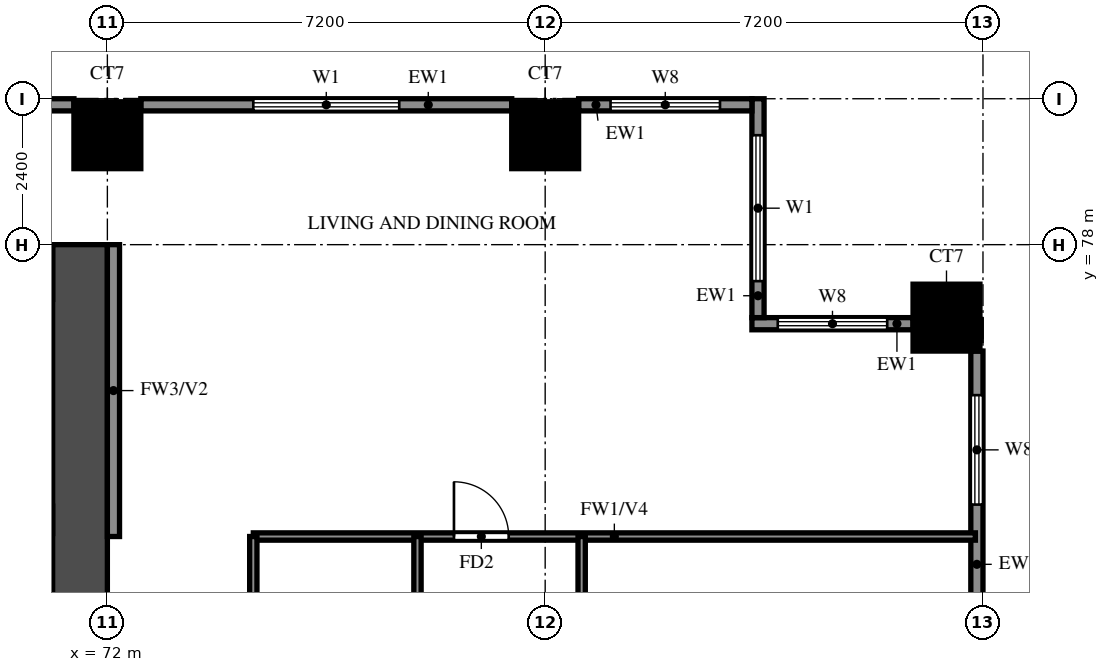
"""IFC4 building model, lengths in metres.
Left out: names, types, materials, properties, quantities, classifications, styles, units other than length and angle.
Written with IfcOpenShell. Run it as: python <this file> out.ifc"""

import sys

from ifc_helpers import new_model, si_unit, direction, frame, frame_2d, origin, origin_2d, place, context, subcontext, project, spatial, rectangle, extrude, source, transform, mapped, element, fill, save


model = new_model("IFC4")
c1 = context("Model", 3, precision=1e-05, world=origin(), true_north=direction((0.0, 1.0)))
c2 = subcontext(c1, "Body", "Model", "MODEL_VIEW")
j1 = project(units=[si_unit("LENGTHUNIT", "METRE"), si_unit("PLANEANGLEUNIT", "RADIAN")], contexts=[c1])
p1 = place(None, origin())
s1 = spatial("IfcSite", under=j1, at=p1, CompositionType="ELEMENT")
p2 = place(p1, origin())
s2 = spatial("IfcBuilding", under=s1, at=p2, CompositionType="ELEMENT")
p3 = place(p2, frame((0.0, 0.0, 55.0)))
s3 = spatial("IfcBuildingStorey", under=s2, at=p3, CompositionType="ELEMENT", Elevation=55.0)
m1 = source(origin(), c2, "Body", "SweptSolid", [
    extrude(rectangle(XDim=1.1, YDim=1.1, at=origin_2d()), origin(), (0.0, 0.0, 1.0), 3.18),
])
for number, where, z_axis, x_axis in (
    (1, (85.8, 76.8, 0.0), (0.0, 0.0, 1.0), (1.0, 0.0, 0.0)),
    (2, (72.0, 79.8, 0.0), (0.0, 0.0, 1.0), (1.0, 0.0, 0.0)),
    (3, (79.2, 79.8, 0.0), (0.0, 0.0, 1.0), (1.0, 0.0, 0.0)),
):
    element("IfcColumn", number, at=place(p3, frame(where, z_axis=z_axis, x_axis=x_axis)), inside=s3, PredefinedType="COLUMN", context=c2, shape_type="MappedRepresentation", body=[
        mapped(m1, transform((0.0, 0.0, 0.0))),
    ])
p4 = place(p3, frame((71.55, 66.0, 0.0), z_axis=(0.0, 0.0, 1.0), x_axis=(0.0, 1.0, 0.0)))
e4 = element("IfcWall", 4, at=p4, inside=s3, PredefinedType="SHEAR", context=c2, shape_type="SweptSolid", body=[
    extrude(rectangle(XDim=12.0, YDim=0.9, at=frame_2d((6.0, 0.0))), origin(), (0.0, 0.0, 1.0), 3.18),
])
p5 = place(p3, frame((29.7, 77.55, 0.0), z_axis=(0.0, 0.0, 1.0), x_axis=(1.0, 0.0, 0.0)))
e5 = element("IfcWall", 5, at=p5, inside=s3, PredefinedType="SHEAR", context=c2, shape_type="SweptSolid", body=[
    extrude(rectangle(XDim=41.4, YDim=0.9, at=frame_2d((20.7, 0.0))), origin(), (0.0, 0.0, 1.0), 3.18),
])
p6 = place(p3, frame((86.3, 70.15, 0.0), z_axis=(0.0, 0.0, 1.0), x_axis=(0.0, 1.0, 0.0)))
e6 = element("IfcWall", 6, at=p6, inside=s3, PredefinedType="SOLIDWALL", context=c2, shape_type="SweptSolid", body=[
    extrude(rectangle(XDim=6.1, YDim=0.2, at=frame_2d((3.05, 0.0))), origin(), (0.0, 0.0, 1.0), 3.18),
])
p7 = place(p6, frame((1.175, 0.0, 1.5)))
e7 = element("IfcOpeningElement", 7, at=p7, cuts=e6, PredefinedType="OPENING", context=c2, shape_type="SweptSolid", body=[
    extrude(rectangle(XDim=0.9, YDim=0.9, at=frame_2d((0.45, 0.45))), frame((0.0, 0.11, 0.0), z_axis=(0.0, -1.0, 0.0), x_axis=(1.0, 0.0, 0.0)), (0.0, 0.0, 1.0), 0.22),
])
p8 = place(p6, frame((3.575, 0.0, 0.6)))
e8 = element("IfcOpeningElement", 8, at=p8, cuts=e6, PredefinedType="OPENING", context=c2, shape_type="SweptSolid", body=[
    extrude(rectangle(XDim=1.8, YDim=2.4, at=frame_2d((0.9, 1.2))), frame((0.0, 0.11, 0.0), z_axis=(0.0, -1.0, 0.0), x_axis=(1.0, 0.0, 0.0)), (0.0, 0.0, 1.0), 0.22),
])
p9 = place(p3, frame((85.25, 76.7, 0.0), z_axis=(0.0, 0.0, 1.0), x_axis=(-1.0, 0.0, 0.0)))
e9 = element("IfcWall", 9, at=p9, inside=s3, PredefinedType="SOLIDWALL", context=c2, shape_type="SweptSolid", body=[
    extrude(rectangle(XDim=2.65, YDim=0.2, at=frame_2d((1.325, 0.0))), origin(), (0.0, 0.0, 1.0), 3.18),
])
p10 = place(p9, frame((0.425, 0.0, 0.6)))
e10 = element("IfcOpeningElement", 10, at=p10, cuts=e9, PredefinedType="OPENING", context=c2, shape_type="SweptSolid", body=[
    extrude(rectangle(XDim=1.8, YDim=2.4, at=frame_2d((0.9, 1.2))), frame((0.0, 0.11, 0.0), z_axis=(0.0, -1.0, 0.0), x_axis=(1.0, 0.0, 0.0)), (0.0, 0.0, 1.0), 0.22),
])
p11 = place(p3, frame((82.7, 76.8, 0.0), z_axis=(0.0, 0.0, 1.0), x_axis=(0.0, 1.0, 0.0)))
e11 = element("IfcWall", 11, at=p11, inside=s3, PredefinedType="SOLIDWALL", context=c2, shape_type="SweptSolid", body=[
    extrude(rectangle(XDim=3.6, YDim=0.2, at=frame_2d((1.8, 0.0))), origin(), (0.0, 0.0, 1.0), 3.18),
])
p12 = place(p11, frame((0.6, 0.0, 0.6)))
e12 = element("IfcOpeningElement", 12, at=p12, cuts=e11, PredefinedType="OPENING", context=c2, shape_type="SweptSolid", body=[
    extrude(rectangle(XDim=2.4, YDim=2.4, at=frame_2d((1.2, 1.2))), frame((0.0, 0.11, 0.0), z_axis=(0.0, -1.0, 0.0), x_axis=(1.0, 0.0, 0.0)), (0.0, 0.0, 1.0), 0.22),
])
p13 = place(p3, frame((82.6, 80.3, 0.0), z_axis=(0.0, 0.0, 1.0), x_axis=(-1.0, 0.0, 0.0)))
e13 = element("IfcWall", 13, at=p13, inside=s3, PredefinedType="SOLIDWALL", context=c2, shape_type="SweptSolid", body=[
    extrude(rectangle(XDim=2.85, YDim=0.2, at=frame_2d((1.425, 0.0))), origin(), (0.0, 0.0, 1.0), 3.18),
])
p14 = place(p13, frame((0.525, 0.0, 0.6)))
e14 = element("IfcOpeningElement", 14, at=p14, cuts=e13, PredefinedType="OPENING", context=c2, shape_type="SweptSolid", body=[
    extrude(rectangle(XDim=1.8, YDim=2.4, at=frame_2d((0.9, 1.2))), frame((0.0, 0.11, 0.0), z_axis=(0.0, -1.0, 0.0), x_axis=(1.0, 0.0, 0.0)), (0.0, 0.0, 1.0), 0.22),
])
p15 = place(p3, frame((78.65, 80.3, 0.0), z_axis=(0.0, 0.0, 1.0), x_axis=(-1.0, 0.0, 0.0)))
e15 = element("IfcWall", 15, at=p15, inside=s3, PredefinedType="SOLIDWALL", context=c2, shape_type="SweptSolid", body=[
    extrude(rectangle(XDim=6.1, YDim=0.2, at=frame_2d((3.05, 0.0))), origin(), (0.0, 0.0, 1.0), 3.18),
])
p16 = place(p15, frame((1.85, 0.0, 0.6)))
e16 = element("IfcOpeningElement", 16, at=p16, cuts=e15, PredefinedType="OPENING", context=c2, shape_type="SweptSolid", body=[
    extrude(rectangle(XDim=2.4, YDim=2.4, at=frame_2d((1.2, 1.2))), frame((0.0, 0.11, 0.0), z_axis=(0.0, -1.0, 0.0), x_axis=(1.0, 0.0, 0.0)), (0.0, 0.0, 1.0), 0.22),
])
p17 = place(p3, frame((71.45, 80.3, 0.0), z_axis=(0.0, 0.0, 1.0), x_axis=(-1.0, 0.0, 0.0)))
e17 = element("IfcWall", 17, at=p17, inside=s3, PredefinedType="SOLIDWALL", context=c2, shape_type="SweptSolid", body=[
    extrude(rectangle(XDim=6.1, YDim=0.2, at=frame_2d((3.05, 0.0))), origin(), (0.0, 0.0, 1.0), 3.18),
])
p18 = place(p3, frame((72.1, 73.2, 0.0), z_axis=(0.0, 0.0, 1.0), x_axis=(0.0, 1.0, 0.0)))
e18 = element("IfcWall", 18, at=p18, inside=s3, PredefinedType="SOLIDWALL", context=c2, shape_type="SweptSolid", body=[
    extrude(rectangle(XDim=4.8, YDim=0.2, at=frame_2d((2.4, 0.0))), origin(), (0.0, 0.0, 1.0), 3.18),
])
p19 = place(p3, frame((74.4, 73.2, 0.0), z_axis=(0.0, 0.0, 1.0), x_axis=(1.0, 0.0, 0.0)))
e19 = element("IfcWall", 19, at=p19, inside=s3, PredefinedType="PARTITIONING", context=c2, shape_type="SweptSolid", body=[
    extrude(rectangle(XDim=11.875, YDim=0.12, at=frame_2d((5.938, 0.0))), origin(), (0.0, 0.0, 1.0), 2.28),
])
p20 = place(p19, frame((3.3, 0.0, 0.0)))
e20 = element("IfcOpeningElement", 20, at=p20, cuts=e19, PredefinedType="OPENING", context=c2, shape_type="SweptSolid", body=[
    extrude(rectangle(XDim=0.9, YDim=2.1, at=frame_2d((0.45, 1.05))), frame((0.0, 0.07, 0.0), z_axis=(0.0, -1.0, 0.0), x_axis=(1.0, 0.0, 0.0)), (0.0, 0.0, 1.0), 0.14),
])
p21 = place(p3, frame((74.4, 69.85, 0.0), z_axis=(0.0, 0.0, 1.0), x_axis=(0.0, 1.0, 0.0)))
e21 = element("IfcWall", 21, at=p21, inside=s3, PredefinedType="PARTITIONING", context=c2, shape_type="SweptSolid", body=[
    extrude(rectangle(XDim=3.35, YDim=0.12, at=frame_2d((1.675, 0.0))), origin(), (0.0, 0.0, 1.0), 3.18),
])
p22 = place(p3, frame((77.1, 61.2, 0.0), z_axis=(0.0, 0.0, 1.0), x_axis=(0.0, 1.0, 0.0)))
e22 = element("IfcWall", 22, at=p22, inside=s3, PredefinedType="PARTITIONING", context=c2, shape_type="SweptSolid", body=[
    extrude(rectangle(XDim=12.0, YDim=0.12, at=frame_2d((6.0, 0.0))), origin(), (0.0, 0.0, 1.0), 3.18),
])
p23 = place(p22, frame((1.475, 0.0, 0.0)))
e23 = element("IfcOpeningElement", 23, at=p23, cuts=e22, PredefinedType="OPENING", context=c2, shape_type="SweptSolid", body=[
    extrude(rectangle(XDim=0.9, YDim=2.1, at=frame_2d((0.45, 1.05))), frame((0.0, 0.07, 0.0), z_axis=(0.0, -1.0, 0.0), x_axis=(1.0, 0.0, 0.0)), (0.0, 0.0, 1.0), 0.14),
])
p24 = place(p22, frame((5.8, 0.0, 0.0)))
e24 = element("IfcOpeningElement", 24, at=p24, cuts=e22, PredefinedType="OPENING", context=c2, shape_type="SweptSolid", body=[
    extrude(rectangle(XDim=0.9, YDim=2.1, at=frame_2d((0.45, 1.05))), frame((0.0, 0.07, 0.0), z_axis=(0.0, -1.0, 0.0), x_axis=(1.0, 0.0, 0.0)), (0.0, 0.0, 1.0), 0.14),
])
p25 = place(p22, frame((9.925, 0.0, 0.0)))
e25 = element("IfcOpeningElement", 25, at=p25, cuts=e22, PredefinedType="OPENING", context=c2, shape_type="SweptSolid", body=[
    extrude(rectangle(XDim=0.8, YDim=2.1, at=frame_2d((0.4, 1.05))), frame((0.0, 0.07, 0.0), z_axis=(0.0, -1.0, 0.0), x_axis=(1.0, 0.0, 0.0)), (0.0, 0.0, 1.0), 0.14),
])
p26 = place(p3, frame((79.8, 69.6, 0.0), z_axis=(0.0, 0.0, 1.0), x_axis=(0.0, 1.0, 0.0)))
e26 = element("IfcWall", 26, at=p26, inside=s3, PredefinedType="PARTITIONING", context=c2, shape_type="SweptSolid", body=[
    extrude(rectangle(XDim=3.6, YDim=0.12, at=frame_2d((1.8, 0.0))), origin(), (0.0, 0.0, 1.0), 3.18),
])
p27 = place(p8, origin())
e27 = element("IfcWindow", 27, at=p27, inside=s3, PartitioningType="DOUBLE_PANEL_VERTICAL", PredefinedType="WINDOW", context=c2, shape_type="SweptSolid", body=[
    extrude(rectangle(XDim=1.8, YDim=2.4, at=frame_2d((0.9, 1.2))), frame((0.0, 0.03, 0.0), z_axis=(0.0, -1.0, 0.0), x_axis=(1.0, 0.0, 0.0)), (0.0, 0.0, 1.0), 0.06),
])
fill(e8, e27)
p28 = place(p10, origin())
e28 = element("IfcWindow", 28, at=p28, inside=s3, PartitioningType="DOUBLE_PANEL_VERTICAL", PredefinedType="WINDOW", context=c2, shape_type="SweptSolid", body=[
    extrude(rectangle(XDim=1.8, YDim=2.4, at=frame_2d((0.9, 1.2))), frame((0.0, 0.03, 0.0), z_axis=(0.0, -1.0, 0.0), x_axis=(1.0, 0.0, 0.0)), (0.0, 0.0, 1.0), 0.06),
])
fill(e10, e28)
p29 = place(p12, origin())
e29 = element("IfcWindow", 29, at=p29, inside=s3, PartitioningType="DOUBLE_PANEL_VERTICAL", PredefinedType="WINDOW", context=c2, shape_type="SweptSolid", body=[
    extrude(rectangle(XDim=2.4, YDim=2.4, at=frame_2d((1.2, 1.2))), frame((0.0, 0.03, 0.0), z_axis=(0.0, -1.0, 0.0), x_axis=(1.0, 0.0, 0.0)), (0.0, 0.0, 1.0), 0.06),
])
fill(e12, e29)
p30 = place(p14, origin())
e30 = element("IfcWindow", 30, at=p30, inside=s3, PartitioningType="DOUBLE_PANEL_VERTICAL", PredefinedType="WINDOW", context=c2, shape_type="SweptSolid", body=[
    extrude(rectangle(XDim=1.8, YDim=2.4, at=frame_2d((0.9, 1.2))), frame((0.0, 0.03, 0.0), z_axis=(0.0, -1.0, 0.0), x_axis=(1.0, 0.0, 0.0)), (0.0, 0.0, 1.0), 0.06),
])
fill(e14, e30)
p31 = place(p16, origin())
e31 = element("IfcWindow", 31, at=p31, inside=s3, PartitioningType="DOUBLE_PANEL_VERTICAL", PredefinedType="WINDOW", context=c2, shape_type="SweptSolid", body=[
    extrude(rectangle(XDim=2.4, YDim=2.4, at=frame_2d((1.2, 1.2))), frame((0.0, 0.03, 0.0), z_axis=(0.0, -1.0, 0.0), x_axis=(1.0, 0.0, 0.0)), (0.0, 0.0, 1.0), 0.06),
])
fill(e16, e31)
p32 = place(p20, origin())
e32 = element("IfcDoor", 32, at=p32, inside=s3, OperationType="SINGLE_SWING_LEFT", PredefinedType="DOOR", context=c2, shape_type="SweptSolid", body=[
    extrude(rectangle(XDim=0.9, YDim=2.1, at=frame_2d((0.45, 1.05))), frame((0.0, 0.025, 0.0), z_axis=(0.0, -1.0, 0.0), x_axis=(1.0, 0.0, 0.0)), (0.0, 0.0, 1.0), 0.05),
])
fill(e20, e32)
save(model, sys.argv[1])
